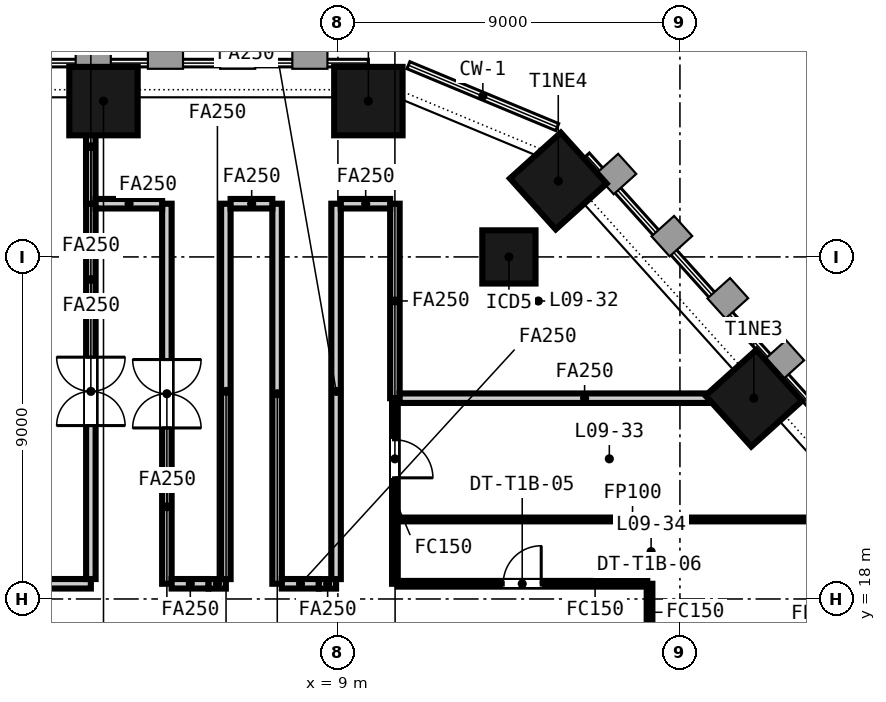
"""IFC4 building model, lengths in metres.
Left out: names, types, materials, properties, quantities, classifications, styles, units other than length and angle.
Written with IfcOpenShell. Run it as: python <this file> out.ifc"""

import sys

from ifc_helpers import new_model, si_unit, direction, frame, frame_2d, origin, origin_2d, place, context, subcontext, project, spatial, rectangle, extrude, element, fill, save


model = new_model("IFC4")
c1 = context("Model", 3, precision=1e-05, world=origin(), true_north=direction((0.0, 1.0)))
c2 = subcontext(c1, "Body", "Model", "MODEL_VIEW")
j1 = project(units=[si_unit("LENGTHUNIT", "METRE"), si_unit("PLANEANGLEUNIT", "RADIAN")], contexts=[c1])
p1 = place(None, origin())
s1 = spatial("IfcSite", under=j1, at=p1, CompositionType="ELEMENT")
p2 = place(p1, origin())
s2 = spatial("IfcBuilding", under=s1, at=p2, CompositionType="ELEMENT")
p3 = place(p2, frame((0.0, 0.0, 46.95)))
s3 = spatial("IfcBuildingStorey", under=s2, at=p3, CompositionType="ELEMENT", Elevation=46.95)
for number, where, z_axis, x_axis in (
    (1, (9.802, 31.1, -0.15), (0.0, 0.0, 1.0), (-1.0, 0.0, 0.0)),
    (2, (2.832, 31.1, -0.15), (0.0, 0.0, 1.0), (-1.0, 0.0, 0.0)),
    (3, (19.944, 23.283, -0.15), (0.0, 0.0, 1.0), (-0.669, 0.743, 0.0)),
    (4, (14.799, 28.998, -0.15), (0.0, 0.0, 1.0), (-0.669, 0.743, 0.0)),
):
    element("IfcColumn", number, at=place(p3, frame(where, z_axis=z_axis, x_axis=x_axis)), inside=s3, PredefinedType="COLUMN", context=c2, shape_type="SweptSolid", body=[
        extrude(rectangle(XDim=1.8, YDim=1.8, at=origin_2d()), origin(), (0.0, 0.0, 1.0), 3.65),
    ])
p4 = place(p3, frame((13.5, 27.0, -0.15), z_axis=(0.0, 0.0, 1.0), x_axis=(1.0, 0.0, 0.0)))
e5 = element("IfcColumn", 5, at=p4, inside=s3, PredefinedType="COLUMN", context=c2, shape_type="SweptSolid", body=[
    extrude(rectangle(XDim=1.4, YDim=1.4, at=origin_2d()), origin(), (0.0, 0.0, 1.0), 3.65),
])
p5 = place(p3, frame((4.5, 28.4, 0.0), z_axis=(0.0, 0.0, 1.0), x_axis=(0.0, -1.0, 0.0)))
e6 = element("IfcWall", 6, at=p5, inside=s3, PredefinedType="PARTITIONING", context=c2, shape_type="SweptSolid", body=[
    extrude(rectangle(XDim=10.0, YDim=0.25, at=frame_2d((5.0, 0.0))), origin(), (0.0, 0.0, 1.0), 2.741),
])
p6 = place(p5, frame((4.1, 0.0, 0.0)))
e7 = element("IfcOpeningElement", 7, at=p6, cuts=e6, PredefinedType="OPENING", context=c2, shape_type="SweptSolid", body=[
    extrude(rectangle(XDim=1.8, YDim=2.1, at=frame_2d((0.9, 1.05))), frame((0.0, 0.135, 0.0), z_axis=(0.0, -1.0, 0.0), x_axis=(1.0, 0.0, 0.0)), (0.0, 0.0, 1.0), 0.27),
])
p7 = place(p3, frame((7.4, 28.4, 0.0), z_axis=(0.0, 0.0, 1.0), x_axis=(0.0, -1.0, 0.0)))
e8 = element("IfcWall", 8, at=p7, inside=s3, PredefinedType="PARTITIONING", context=c2, shape_type="SweptSolid", body=[
    extrude(rectangle(XDim=10.0, YDim=0.25, at=frame_2d((5.0, 0.0))), origin(), (0.0, 0.0, 1.0), 2.741),
])
p8 = place(p3, frame((10.5, 28.4, 0.0), z_axis=(0.0, 0.0, 1.0), x_axis=(0.0, -1.0, 0.0)))
e9 = element("IfcWall", 9, at=p8, inside=s3, PredefinedType="PARTITIONING", context=c2, shape_type="SweptSolid", body=[
    extrude(rectangle(XDim=5.117, YDim=0.25, at=frame_2d((2.559, 0.0))), origin(), (0.0, 0.0, 1.0), 2.741),
])
p9 = place(p3, frame((10.5, 23.283, 0.0), z_axis=(0.0, 0.0, 1.0), x_axis=(0.0, -1.0, 0.0)))
e10 = element("IfcWall", 10, at=p9, inside=s3, PredefinedType="PARTITIONING", context=c2, shape_type="SweptSolid", body=[
    extrude(rectangle(XDim=3.191, YDim=0.15, at=frame_2d((1.595, 0.0))), origin(), (0.0, 0.0, 1.0), 2.741),
])
p10 = place(p9, frame((1.095, 0.0, 0.0)))
e11 = element("IfcOpeningElement", 11, at=p10, cuts=e10, PredefinedType="OPENING", context=c2, shape_type="SweptSolid", body=[
    extrude(rectangle(XDim=1.0, YDim=2.1, at=frame_2d((0.5, 1.05))), frame((0.0, 0.085, 0.0), z_axis=(0.0, -1.0, 0.0), x_axis=(1.0, 0.0, 0.0)), (0.0, 0.0, 1.0), 0.17),
])
p11 = place(p3, frame((10.5, 20.092, 0.0), z_axis=(0.0, 0.0, 1.0), x_axis=(0.0, -1.0, 0.0)))
e12 = element("IfcWall", 12, at=p11, inside=s3, PredefinedType="PARTITIONING", context=c2, shape_type="SweptSolid", body=[
    extrude(rectangle(XDim=1.692, YDim=0.15, at=frame_2d((0.846, 0.0))), origin(), (0.0, 0.0, 1.0), 2.741),
])
p12 = place(p3, frame((17.2, 18.4, 0.0), z_axis=(0.0, 0.0, 1.0), x_axis=(0.0, -1.0, 0.0)))
e13 = element("IfcWall", 13, at=p12, inside=s3, PredefinedType="PARTITIONING", context=c2, shape_type="SweptSolid", body=[
    extrude(rectangle(XDim=1.5, YDim=0.15, at=frame_2d((0.75, 0.0))), origin(), (0.0, 0.0, 1.0), 2.741),
])
p13 = place(p3, frame((-4.91, 18.4, 0.0), z_axis=(0.0, 0.0, 1.0), x_axis=(1.0, 0.0, 0.0)))
e14 = element("IfcWall", 14, at=p13, inside=s3, PredefinedType="PARTITIONING", context=c2, shape_type="SweptSolid", body=[
    extrude(rectangle(XDim=7.41, YDim=0.25, at=frame_2d((3.705, 0.0))), origin(), (0.0, 0.0, 1.0), 2.741),
])
p14 = place(p3, frame((2.5, 18.525, 0.0), z_axis=(0.0, 0.0, 1.0), x_axis=(0.0, 1.0, 0.0)))
e15 = element("IfcWall", 15, at=p14, inside=s3, PredefinedType="PARTITIONING", context=c2, shape_type="SweptSolid", body=[
    extrude(rectangle(XDim=9.875, YDim=0.25, at=frame_2d((4.938, 0.0))), origin(), (0.0, 0.0, 1.0), 2.741),
])
p15 = place(p14, frame((4.038, 0.0, 0.0)))
e16 = element("IfcOpeningElement", 16, at=p15, cuts=e15, PredefinedType="OPENING", context=c2, shape_type="SweptSolid", body=[
    extrude(rectangle(XDim=1.8, YDim=2.1, at=frame_2d((0.9, 1.05))), frame((0.0, 0.135, 0.0), z_axis=(0.0, -1.0, 0.0), x_axis=(1.0, 0.0, 0.0)), (0.0, 0.0, 1.0), 0.27),
])
p16 = place(p3, frame((2.498, 28.4, 0.0), z_axis=(0.0, 0.0, 1.0), x_axis=(0.0, 1.0, 0.0)))
e17 = element("IfcWall", 17, at=p16, inside=s3, PredefinedType="PARTITIONING", context=c2, shape_type="SweptSolid", body=[
    extrude(rectangle(XDim=3.0, YDim=0.25, at=frame_2d((1.5, 0.0))), origin(), (0.0, 0.0, 1.0), 2.741),
])
p17 = place(p3, frame((2.625, 28.4, 0.0), z_axis=(0.0, 0.0, 1.0), x_axis=(1.0, 0.0, 0.0)))
e18 = element("IfcWall", 18, at=p17, inside=s3, PredefinedType="PARTITIONING", context=c2, shape_type="SweptSolid", body=[
    extrude(rectangle(XDim=1.75, YDim=0.25, at=frame_2d((0.875, 0.0))), origin(), (0.0, 0.0, 1.0), 2.741),
])
p18 = place(p3, frame((4.625, 18.4, 0.0), z_axis=(0.0, 0.0, 1.0), x_axis=(1.0, 0.0, 0.0)))
e19 = element("IfcWall", 19, at=p18, inside=s3, PredefinedType="PARTITIONING", context=c2, shape_type="SweptSolid", body=[
    extrude(rectangle(XDim=0.973, YDim=0.25, at=frame_2d((0.486, 0.0))), origin(), (0.0, 0.0, 1.0), 2.741),
])
p19 = place(p3, frame((5.598, 18.398, 0.0), z_axis=(0.0, 0.0, 1.0), x_axis=(1.0, 0.0, 0.0)))
e20 = element("IfcWall", 20, at=p19, inside=s3, PredefinedType="PARTITIONING", context=c2, shape_type="SweptSolid", body=[
    extrude(rectangle(XDim=0.454, YDim=0.25, at=frame_2d((0.227, 0.0))), origin(), (0.0, 0.0, 1.0), 2.741),
])
p20 = place(p3, frame((6.052, 18.523, 0.0), z_axis=(0.0, 0.0, 1.0), x_axis=(0.0, 1.0, 0.0)))
e21 = element("IfcWall", 21, at=p20, inside=s3, PredefinedType="PARTITIONING", context=c2, shape_type="SweptSolid", body=[
    extrude(rectangle(XDim=9.877, YDim=0.25, at=frame_2d((4.938, 0.0))), origin(), (0.0, 0.0, 1.0), 2.741),
])
p21 = place(p3, frame((6.177, 28.4, 0.0), z_axis=(0.0, 0.0, 1.0), x_axis=(1.0, 0.0, 0.0)))
e22 = element("IfcWall", 22, at=p21, inside=s3, PredefinedType="PARTITIONING", context=c2, shape_type="SweptSolid", body=[
    extrude(rectangle(XDim=1.098, YDim=0.25, at=frame_2d((0.549, 0.0))), origin(), (0.0, 0.0, 1.0), 2.741),
])
p22 = place(p3, frame((7.525, 18.4, 0.0), z_axis=(0.0, 0.0, 1.0), x_axis=(1.0, 0.0, 0.0)))
e23 = element("IfcWall", 23, at=p22, inside=s3, PredefinedType="PARTITIONING", context=c2, shape_type="SweptSolid", body=[
    extrude(rectangle(XDim=0.973, YDim=0.25, at=frame_2d((0.487, 0.0))), origin(), (0.0, 0.0, 1.0), 2.741),
])
p23 = place(p3, frame((8.498, 18.398, 0.0), z_axis=(0.0, 0.0, 1.0), x_axis=(1.0, 0.0, 0.0)))
e24 = element("IfcWall", 24, at=p23, inside=s3, PredefinedType="PARTITIONING", context=c2, shape_type="SweptSolid", body=[
    extrude(rectangle(XDim=0.454, YDim=0.25, at=frame_2d((0.227, 0.0))), origin(), (0.0, 0.0, 1.0), 2.741),
])
p24 = place(p3, frame((8.952, 18.523, 0.0), z_axis=(0.0, 0.0, 1.0), x_axis=(0.0, 1.0, 0.0)))
e25 = element("IfcWall", 25, at=p24, inside=s3, PredefinedType="PARTITIONING", context=c2, shape_type="SweptSolid", body=[
    extrude(rectangle(XDim=9.877, YDim=0.25, at=frame_2d((4.938, 0.0))), origin(), (0.0, 0.0, 1.0), 2.741),
])
p25 = place(p3, frame((9.077, 28.4, 0.0), z_axis=(0.0, 0.0, 1.0), x_axis=(1.0, 0.0, 0.0)))
e26 = element("IfcWall", 26, at=p25, inside=s3, PredefinedType="PARTITIONING", context=c2, shape_type="SweptSolid", body=[
    extrude(rectangle(XDim=1.298, YDim=0.25, at=frame_2d((0.649, 0.0))), origin(), (0.0, 0.0, 1.0), 2.741),
])
p26 = place(p3, frame((10.625, 23.283, 0.0), z_axis=(0.0, 0.0, 1.0), x_axis=(1.0, 0.0, 0.0)))
e27 = element("IfcWall", 27, at=p26, inside=s3, PredefinedType="PARTITIONING", context=c2, shape_type="SweptSolid", body=[
    extrude(rectangle(XDim=9.722, YDim=0.25, at=frame_2d((4.861, 0.0))), origin(), (0.0, 0.0, 1.0), 2.741),
])
p27 = place(p3, frame((10.575, 20.092, 0.0), z_axis=(0.0, 0.0, 1.0), x_axis=(1.0, 0.0, 0.0)))
e28 = element("IfcWall", 28, at=p27, inside=s3, PredefinedType="PARTITIONING", context=c2, shape_type="SweptSolid", body=[
    extrude(rectangle(XDim=12.346, YDim=0.1, at=frame_2d((6.173, 0.0))), origin(), (0.0, 0.0, 1.0), 2.741),
])
p28 = place(p3, frame((10.575, 18.4, 0.0), z_axis=(0.0, 0.0, 1.0), x_axis=(1.0, 0.0, 0.0)))
e29 = element("IfcWall", 29, at=p28, inside=s3, PredefinedType="PARTITIONING", context=c2, shape_type="SweptSolid", body=[
    extrude(rectangle(XDim=6.55, YDim=0.15, at=frame_2d((3.275, 0.0))), origin(), (0.0, 0.0, 1.0), 2.741),
])
p29 = place(p28, frame((2.775, 0.0, 0.0)))
e30 = element("IfcOpeningElement", 30, at=p29, cuts=e29, PredefinedType="OPENING", context=c2, shape_type="SweptSolid", body=[
    extrude(rectangle(XDim=1.0, YDim=2.1, at=frame_2d((0.5, 1.05))), frame((0.0, 0.085, 0.0), z_axis=(0.0, -1.0, 0.0), x_axis=(1.0, 0.0, 0.0)), (0.0, 0.0, 1.0), 0.17),
])
p30 = place(p15, origin())
e31 = element("IfcDoor", 31, at=p30, inside=s3, OperationType="DOUBLE_DOOR_DOUBLE_SWING", PredefinedType="DOOR", context=c2, shape_type="SweptSolid", body=[
    extrude(rectangle(XDim=1.8, YDim=2.1, at=frame_2d((0.9, 1.05))), frame((0.0, 0.025, 0.0), z_axis=(0.0, -1.0, 0.0), x_axis=(1.0, 0.0, 0.0)), (0.0, 0.0, 1.0), 0.05),
])
fill(e16, e31)
p31 = place(p6, origin())
e32 = element("IfcDoor", 32, at=p31, inside=s3, OperationType="DOUBLE_DOOR_DOUBLE_SWING", PredefinedType="DOOR", context=c2, shape_type="SweptSolid", body=[
    extrude(rectangle(XDim=1.8, YDim=2.1, at=frame_2d((0.9, 1.05))), frame((0.0, 0.025, 0.0), z_axis=(0.0, -1.0, 0.0), x_axis=(1.0, 0.0, 0.0)), (0.0, 0.0, 1.0), 0.05),
])
fill(e7, e32)
p32 = place(p10, origin())
e33 = element("IfcDoor", 33, at=p32, inside=s3, OperationType="SINGLE_SWING_RIGHT", PredefinedType="DOOR", context=c2, shape_type="SweptSolid", body=[
    extrude(rectangle(XDim=1.0, YDim=2.1, at=frame_2d((0.5, 1.05))), frame((0.0, 0.025, 0.0), z_axis=(0.0, -1.0, 0.0), x_axis=(1.0, 0.0, 0.0)), (0.0, 0.0, 1.0), 0.05),
])
fill(e11, e33)
p33 = place(p29, origin())
e34 = element("IfcDoor", 34, at=p33, inside=s3, OperationType="SINGLE_SWING_RIGHT", PredefinedType="DOOR", context=c2, shape_type="SweptSolid", body=[
    extrude(rectangle(XDim=1.0, YDim=2.1, at=frame_2d((0.5, 1.05))), frame((0.0, 0.025, 0.0), z_axis=(0.0, -1.0, 0.0), x_axis=(1.0, 0.0, 0.0)), (0.0, 0.0, 1.0), 0.05),
])
fill(e30, e34)
save(model, sys.argv[1])
